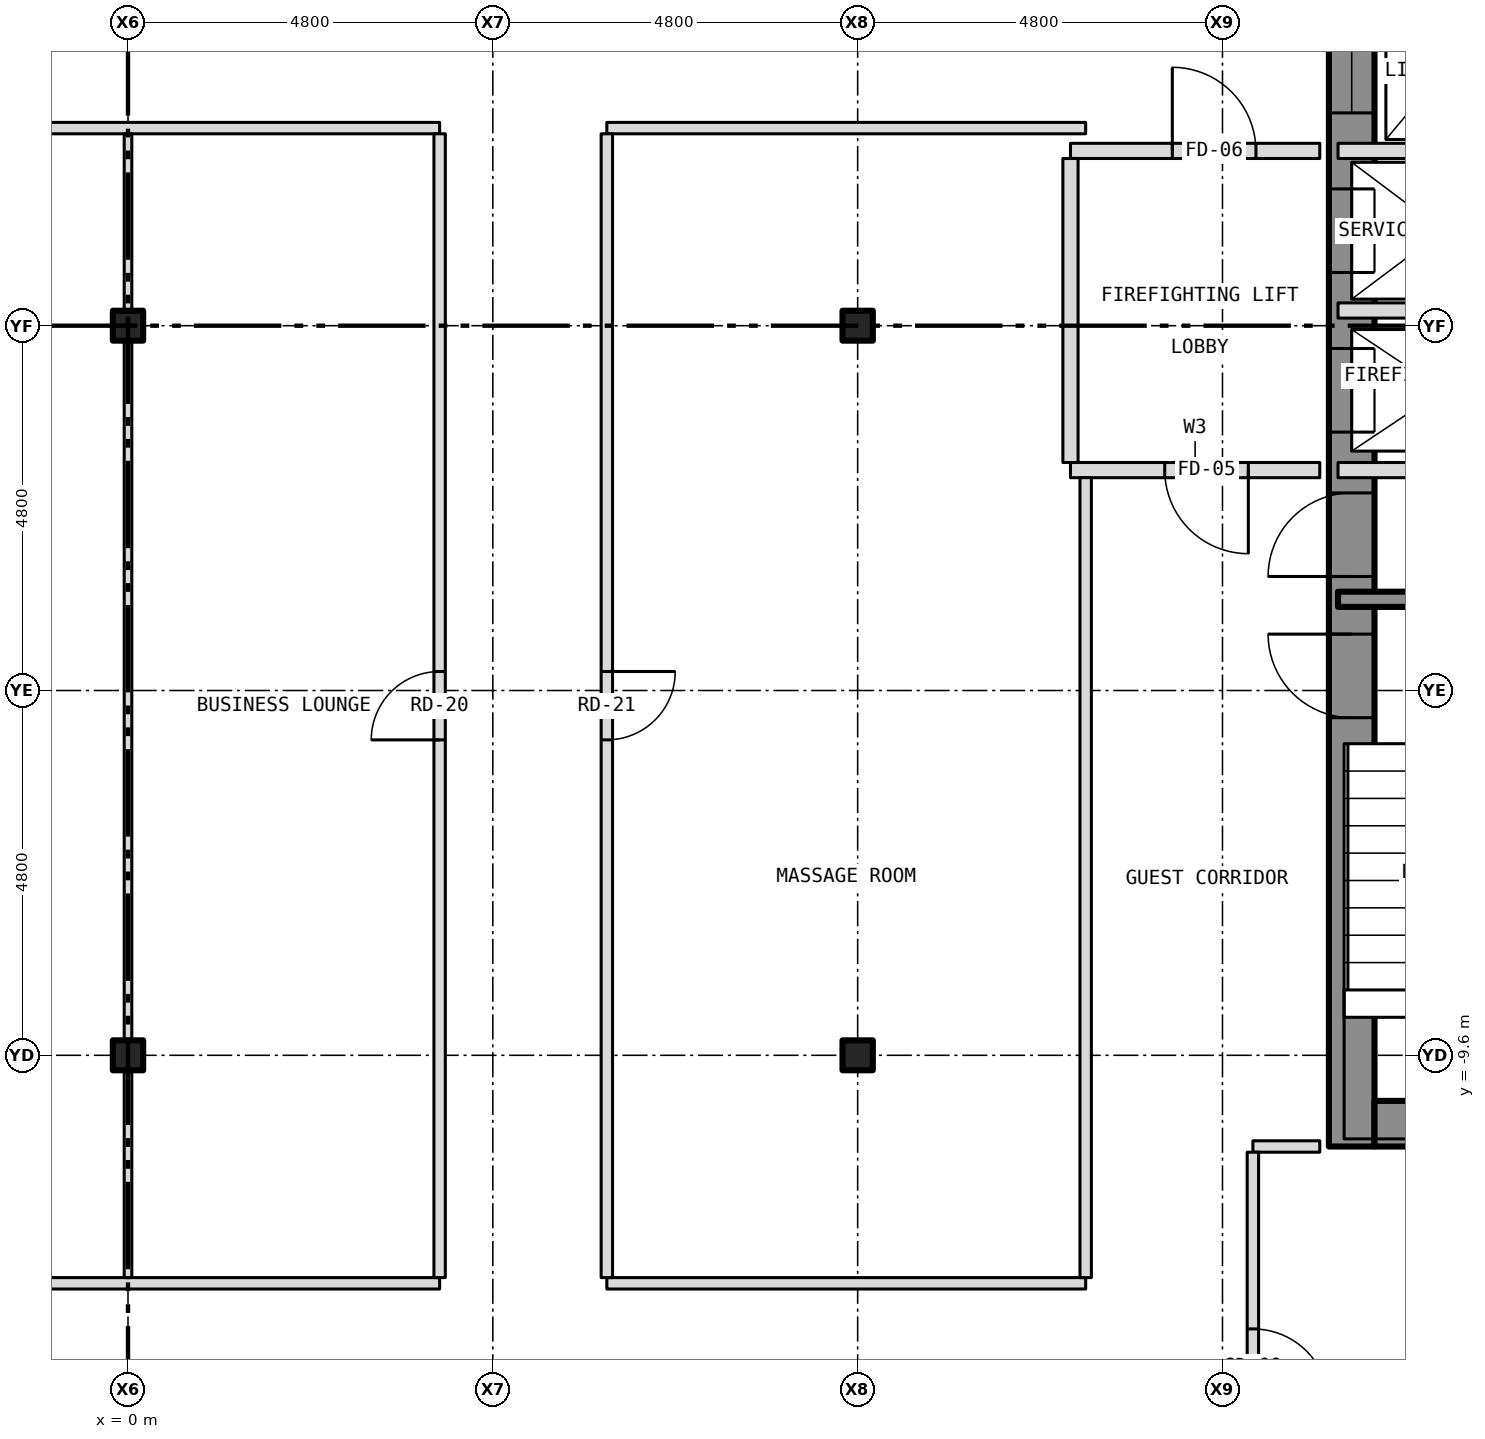
"""IFC4 building model, lengths in metres.
Left out: names, types, materials, properties, quantities, classifications, styles, units other than length and angle.
Written with IfcOpenShell. Run it as: python <this file> out.ifc"""

import sys

from ifc_helpers import new_model, si_unit, direction, frame, frame_2d, origin, origin_2d, place, context, subcontext, project, spatial, rectangle, i_section, extrude, element, fill, save


model = new_model("IFC4")
c1 = context("Model", 3, precision=1e-05, world=origin(), true_north=direction((0.0, 1.0)))
c2 = subcontext(c1, "Body", "Model", "MODEL_VIEW")
j1 = project(units=[si_unit("LENGTHUNIT", "METRE"), si_unit("PLANEANGLEUNIT", "RADIAN")], contexts=[c1])
p1 = place(None, origin())
s1 = spatial("IfcSite", under=j1, at=p1, CompositionType="ELEMENT")
p2 = place(p1, origin())
s2 = spatial("IfcBuilding", under=s1, at=p2, CompositionType="ELEMENT")
p3 = place(p2, frame((0.0, 0.0, 106.5)))
s3 = spatial("IfcBuildingStorey", under=s2, at=p3, CompositionType="ELEMENT", Elevation=106.5)
for number, where, z_axis, x_axis in (
    (1, (0.0, -9.6, -0.15), (0.0, 0.0, 1.0), (1.0, 0.0, 0.0)),
    (2, (0.0, 0.0, -0.15), (0.0, 0.0, 1.0), (1.0, 0.0, 0.0)),
    (3, (9.6, -9.6, -0.15), (0.0, 0.0, 1.0), (1.0, 0.0, 0.0)),
    (4, (9.6, 0.0, -0.15), (0.0, 0.0, 1.0), (1.0, 0.0, 0.0)),
):
    element("IfcColumn", number, at=place(p3, frame(where, z_axis=z_axis, x_axis=x_axis)), inside=s3, PredefinedType="COLUMN", context=c2, shape_type="SweptSolid", body=[
        extrude(i_section(OverallWidth=0.399, OverallDepth=0.394, WebThickness=0.023, FlangeThickness=0.037, at=origin_2d()), origin(), (0.0, 0.0, 1.0), 3.5),
    ])
p4 = place(p3, frame((16.1, -10.8, 0.0), z_axis=(0.0, 0.0, 1.0), x_axis=(0.0, 1.0, 0.0)))
e5 = element("IfcWall", 5, at=p4, inside=s3, PredefinedType="SHEAR", context=c2, shape_type="SweptSolid", body=[
    extrude(rectangle(XDim=21.6, YDim=0.6, at=frame_2d((10.8, 0.0))), origin(), (0.0, 0.0, 1.0), 3.25),
])
p5 = place(p4, frame((9.4, 0.0, 0.0)))
e6 = element("IfcOpeningElement", 6, at=p5, cuts=e5, PredefinedType="OPENING", context=c2, shape_type="SweptSolid", body=[
    extrude(rectangle(XDim=1.1, YDim=2.1, at=frame_2d((0.55, 1.05))), frame((0.0, 0.312, 0.0), z_axis=(0.0, -1.0, 0.0), x_axis=(1.0, 0.0, 0.0)), (0.0, 0.0, 1.0), 0.624),
])
p6 = place(p4, frame((11.5, 0.0, 0.0)))
e7 = element("IfcOpeningElement", 7, at=p6, cuts=e5, PredefinedType="OPENING", context=c2, shape_type="SweptSolid", body=[
    extrude(rectangle(XDim=1.1, YDim=2.1, at=frame_2d((0.55, 1.05))), frame((0.0, 0.312, 0.0), z_axis=(0.0, -1.0, 0.0), x_axis=(1.0, 0.0, 0.0)), (0.0, 0.0, 1.0), 0.624),
])
p7 = place(p4, frame((13.6, 0.0, 0.0)))
e8 = element("IfcOpeningElement", 8, at=p7, cuts=e5, PredefinedType="OPENING", context=c2, shape_type="SweptSolid", body=[
    extrude(rectangle(XDim=1.1, YDim=2.1, at=frame_2d((0.55, 1.05))), frame((0.0, 0.312, 0.0), z_axis=(0.0, -1.0, 0.0), x_axis=(1.0, 0.0, 0.0)), (0.0, 0.0, 1.0), 0.624),
])
p8 = place(p4, frame((15.7, 0.0, 0.0)))
e9 = element("IfcOpeningElement", 9, at=p8, cuts=e5, PredefinedType="OPENING", context=c2, shape_type="SweptSolid", body=[
    extrude(rectangle(XDim=1.1, YDim=2.1, at=frame_2d((0.55, 1.05))), frame((0.0, 0.312, 0.0), z_axis=(0.0, -1.0, 0.0), x_axis=(1.0, 0.0, 0.0)), (0.0, 0.0, 1.0), 0.624),
])
p9 = place(p4, frame((17.8, 0.0, 0.0)))
e10 = element("IfcOpeningElement", 10, at=p9, cuts=e5, PredefinedType="OPENING", context=c2, shape_type="SweptSolid", body=[
    extrude(rectangle(XDim=1.1, YDim=2.1, at=frame_2d((0.55, 1.05))), frame((0.0, 0.312, 0.0), z_axis=(0.0, -1.0, 0.0), x_axis=(1.0, 0.0, 0.0)), (0.0, 0.0, 1.0), 0.624),
])
p10 = place(p4, frame((5.642, 0.0, 0.0)))
e11 = element("IfcOpeningElement", 11, at=p10, cuts=e5, PredefinedType="OPENING", context=c2, shape_type="SweptSolid", body=[
    extrude(rectangle(XDim=1.1, YDim=2.1, at=frame_2d((0.55, 1.05))), frame((0.0, 0.312, 0.0), z_axis=(0.0, -1.0, 0.0), x_axis=(1.0, 0.0, 0.0)), (0.0, 0.0, 1.0), 0.624),
])
p11 = place(p4, frame((7.5, 0.0, 0.0)))
e12 = element("IfcOpeningElement", 12, at=p11, cuts=e5, PredefinedType="OPENING", context=c2, shape_type="SweptSolid", body=[
    extrude(rectangle(XDim=1.1, YDim=2.1, at=frame_2d((0.55, 1.05))), frame((0.0, 0.312, 0.0), z_axis=(0.0, -1.0, 0.0), x_axis=(1.0, 0.0, 0.0)), (0.0, 0.0, 1.0), 0.624),
])
p12 = place(p3, frame((16.4, -10.5, 0.0), z_axis=(0.0, 0.0, 1.0), x_axis=(1.0, 0.0, 0.0)))
e13 = element("IfcWall", 13, at=p12, inside=s3, PredefinedType="SHEAR", context=c2, shape_type="SweptSolid", body=[
    extrude(rectangle(XDim=5.8, YDim=0.6, at=frame_2d((2.9, 0.0))), origin(), (0.0, 0.0, 1.0), 3.25),
])
p13 = place(p3, frame((-12.6, -12.6, 0.0), z_axis=(0.0, 0.0, 1.0), x_axis=(1.0, 0.0, 0.0)))
e14 = element("IfcWall", 14, at=p13, inside=s3, PredefinedType="PARTITIONING", context=c2, shape_type="SweptSolid", body=[
    extrude(rectangle(XDim=16.7, YDim=0.15, at=frame_2d((8.35, 0.0))), origin(), (0.0, 0.0, 1.0), 3.35),
])
p14 = place(p3, frame((6.3, -12.6, 0.0), z_axis=(0.0, 0.0, 1.0), x_axis=(1.0, 0.0, 0.0)))
e15 = element("IfcWall", 15, at=p14, inside=s3, PredefinedType="PARTITIONING", context=c2, shape_type="SweptSolid", body=[
    extrude(rectangle(XDim=6.3, YDim=0.15, at=frame_2d((3.15, 0.0))), origin(), (0.0, 0.0, 1.0), 3.35),
])
p15 = place(p3, frame((14.8, -10.8, 0.0), z_axis=(0.0, 0.0, 1.0), x_axis=(1.0, 0.0, 0.0)))
e16 = element("IfcWall", 16, at=p15, inside=s3, PredefinedType="PARTITIONING", context=c2, shape_type="SweptSolid", body=[
    extrude(rectangle(XDim=0.88, YDim=0.15, at=frame_2d((0.44, 0.0))), origin(), (0.0, 0.0, 1.0), 3.35),
])
p16 = place(p3, frame((15.92, -3.6, 0.0), z_axis=(0.0, 0.0, 1.0), x_axis=(1.0, 0.0, 0.0)))
e17 = element("IfcWall", 17, at=p16, inside=s3, PredefinedType="SHEAR", context=c2, shape_type="SweptSolid", body=[
    extrude(rectangle(XDim=4.08, YDim=0.2, at=frame_2d((2.04, 0.0))), origin(), (0.0, 0.0, 1.0), 3.25),
])
p17 = place(p3, frame((12.4, -1.9, 0.0), z_axis=(0.0, 0.0, 1.0), x_axis=(1.0, 0.0, 0.0)))
e18 = element("IfcWall", 18, at=p17, inside=s3, PredefinedType="PARTITIONING", context=c2, shape_type="SweptSolid", body=[
    extrude(rectangle(XDim=3.28, YDim=0.2, at=frame_2d((1.64, 0.0))), origin(), (0.0, 0.0, 1.0), 3.35),
])
p18 = place(p17, frame((1.24, 0.0, 0.0)))
e19 = element("IfcOpeningElement", 19, at=p18, cuts=e18, PredefinedType="OPENING", context=c2, shape_type="SweptSolid", body=[
    extrude(rectangle(XDim=1.1, YDim=2.1, at=frame_2d((0.55, 1.05))), frame((0.0, 0.112, 0.0), z_axis=(0.0, -1.0, 0.0), x_axis=(1.0, 0.0, 0.0)), (0.0, 0.0, 1.0), 0.224),
])
p19 = place(p3, frame((15.92, -1.9, 0.0), z_axis=(0.0, 0.0, 1.0), x_axis=(1.0, 0.0, 0.0)))
e20 = element("IfcWall", 20, at=p19, inside=s3, PredefinedType="PARTITIONING", context=c2, shape_type="SweptSolid", body=[
    extrude(rectangle(XDim=6.76, YDim=0.2, at=frame_2d((3.38, 0.0))), origin(), (0.0, 0.0, 1.0), 3.25),
])
p20 = place(p19, frame((3.74, 0.0, 0.0)))
e21 = element("IfcOpeningElement", 21, at=p20, cuts=e20, PredefinedType="OPENING", context=c2, shape_type="SweptSolid", body=[
    extrude(rectangle(XDim=0.9, YDim=2.1, at=frame_2d((0.45, 1.05))), frame((0.0, 0.112, 0.0), z_axis=(0.0, -1.0, 0.0), x_axis=(1.0, 0.0, 0.0)), (0.0, 0.0, 1.0), 0.224),
])
p21 = place(p3, frame((15.92, 0.2, 0.0), z_axis=(0.0, 0.0, 1.0), x_axis=(1.0, 0.0, 0.0)))
e22 = element("IfcWall", 22, at=p21, inside=s3, PredefinedType="PARTITIONING", context=c2, shape_type="SweptSolid", body=[
    extrude(rectangle(XDim=2.88, YDim=0.2, at=frame_2d((1.44, 0.0))), origin(), (0.0, 0.0, 1.0), 3.25),
])
p22 = place(p3, frame((12.4, 2.3, 0.0), z_axis=(0.0, 0.0, 1.0), x_axis=(1.0, 0.0, 0.0)))
e23 = element("IfcWall", 23, at=p22, inside=s3, PredefinedType="PARTITIONING", context=c2, shape_type="SweptSolid", body=[
    extrude(rectangle(XDim=3.28, YDim=0.2, at=frame_2d((1.64, 0.0))), origin(), (0.0, 0.0, 1.0), 3.35),
])
p23 = place(p22, frame((1.34, 0.0, 0.0)))
e24 = element("IfcOpeningElement", 24, at=p23, cuts=e23, PredefinedType="OPENING", context=c2, shape_type="SweptSolid", body=[
    extrude(rectangle(XDim=1.1, YDim=2.1, at=frame_2d((0.55, 1.05))), frame((0.0, 0.112, 0.0), z_axis=(0.0, -1.0, 0.0), x_axis=(1.0, 0.0, 0.0)), (0.0, 0.0, 1.0), 0.224),
])
p24 = place(p3, frame((15.92, 2.3, 0.0), z_axis=(0.0, 0.0, 1.0), x_axis=(1.0, 0.0, 0.0)))
e25 = element("IfcWall", 25, at=p24, inside=s3, PredefinedType="PARTITIONING", context=c2, shape_type="SweptSolid", body=[
    extrude(rectangle(XDim=2.88, YDim=0.2, at=frame_2d((1.44, 0.0))), origin(), (0.0, 0.0, 1.0), 3.25),
])
p25 = place(p3, frame((-12.6, 2.6, 0.0), z_axis=(0.0, 0.0, 1.0), x_axis=(1.0, 0.0, 0.0)))
e26 = element("IfcWall", 26, at=p25, inside=s3, PredefinedType="PARTITIONING", context=c2, shape_type="SweptSolid", body=[
    extrude(rectangle(XDim=16.7, YDim=0.15, at=frame_2d((8.35, 0.0))), origin(), (0.0, 0.0, 1.0), 3.35),
])
p26 = place(p25, frame((5.85, 0.0, 0.0)))
e27 = element("IfcOpeningElement", 27, at=p26, cuts=e26, PredefinedType="OPENING", context=c2, shape_type="SweptSolid", body=[
    extrude(rectangle(XDim=0.9, YDim=2.1, at=frame_2d((0.45, 1.05))), frame((0.0, 0.087, 0.0), z_axis=(0.0, -1.0, 0.0), x_axis=(1.0, 0.0, 0.0)), (0.0, 0.0, 1.0), 0.174),
])
p27 = place(p3, frame((6.3, 2.6, 0.0), z_axis=(0.0, 0.0, 1.0), x_axis=(1.0, 0.0, 0.0)))
e28 = element("IfcWall", 28, at=p27, inside=s3, PredefinedType="PARTITIONING", context=c2, shape_type="SweptSolid", body=[
    extrude(rectangle(XDim=6.3, YDim=0.15, at=frame_2d((3.15, 0.0))), origin(), (0.0, 0.0, 1.0), 3.35),
])
p28 = place(p3, frame((0.0, -12.525, 0.0), z_axis=(0.0, 0.0, 1.0), x_axis=(0.0, 1.0, 0.0)))
e29 = element("IfcWall", 29, at=p28, inside=s3, PredefinedType="PARTITIONING", context=c2, shape_type="SweptSolid", body=[
    extrude(rectangle(XDim=2.726, YDim=0.1, at=frame_2d((1.363, 0.0))), origin(), (0.0, 0.0, 1.0), 2.728),
])
p29 = place(p3, frame((0.0, -9.799, 0.0), z_axis=(0.0, 0.0, 1.0), x_axis=(0.0, 1.0, 0.0)))
e30 = element("IfcWall", 30, at=p29, inside=s3, PredefinedType="PARTITIONING", context=c2, shape_type="SweptSolid", body=[
    extrude(rectangle(XDim=0.398, YDim=0.1, at=frame_2d((0.199, 0.0))), origin(), (0.0, 0.0, 1.0), 3.35),
])
p30 = place(p3, frame((0.0, -9.401, 0.0), z_axis=(0.0, 0.0, 1.0), x_axis=(0.0, 1.0, 0.0)))
e31 = element("IfcWall", 31, at=p30, inside=s3, PredefinedType="PARTITIONING", context=c2, shape_type="SweptSolid", body=[
    extrude(rectangle(XDim=9.202, YDim=0.1, at=frame_2d((4.601, 0.0))), origin(), (0.0, 0.0, 1.0), 2.728),
])
p31 = place(p3, frame((0.0, -0.199, 0.0), z_axis=(0.0, 0.0, 1.0), x_axis=(0.0, 1.0, 0.0)))
e32 = element("IfcWall", 32, at=p31, inside=s3, PredefinedType="PARTITIONING", context=c2, shape_type="SweptSolid", body=[
    extrude(rectangle(XDim=0.398, YDim=0.1, at=frame_2d((0.199, 0.0))), origin(), (0.0, 0.0, 1.0), 3.35),
])
p32 = place(p3, frame((0.0, 0.199, 0.0), z_axis=(0.0, 0.0, 1.0), x_axis=(0.0, 1.0, 0.0)))
e33 = element("IfcWall", 33, at=p32, inside=s3, PredefinedType="PARTITIONING", context=c2, shape_type="SweptSolid", body=[
    extrude(rectangle(XDim=2.326, YDim=0.1, at=frame_2d((1.163, 0.0))), origin(), (0.0, 0.0, 1.0), 2.728),
])
p33 = place(p3, frame((4.1, -12.525, 0.0), z_axis=(0.0, 0.0, 1.0), x_axis=(0.0, 1.0, 0.0)))
e34 = element("IfcWall", 34, at=p33, inside=s3, PredefinedType="PARTITIONING", context=c2, shape_type="SweptSolid", body=[
    extrude(rectangle(XDim=15.05, YDim=0.15, at=frame_2d((7.525, 0.0))), origin(), (0.0, 0.0, 1.0), 3.35),
])
p34 = place(p33, frame((7.075, 0.0, 0.0)))
e35 = element("IfcOpeningElement", 35, at=p34, cuts=e34, PredefinedType="OPENING", context=c2, shape_type="SweptSolid", body=[
    extrude(rectangle(XDim=0.9, YDim=2.1, at=frame_2d((0.45, 1.05))), frame((0.0, 0.087, 0.0), z_axis=(0.0, -1.0, 0.0), x_axis=(1.0, 0.0, 0.0)), (0.0, 0.0, 1.0), 0.174),
])
p35 = place(p3, frame((6.3, -12.525, 0.0), z_axis=(0.0, 0.0, 1.0), x_axis=(0.0, 1.0, 0.0)))
e36 = element("IfcWall", 36, at=p35, inside=s3, PredefinedType="PARTITIONING", context=c2, shape_type="SweptSolid", body=[
    extrude(rectangle(XDim=15.05, YDim=0.15, at=frame_2d((7.525, 0.0))), origin(), (0.0, 0.0, 1.0), 3.35),
])
p36 = place(p35, frame((7.075, 0.0, 0.0)))
e37 = element("IfcOpeningElement", 37, at=p36, cuts=e36, PredefinedType="OPENING", context=c2, shape_type="SweptSolid", body=[
    extrude(rectangle(XDim=0.9, YDim=2.1, at=frame_2d((0.45, 1.05))), frame((0.0, 0.087, 0.0), z_axis=(0.0, -1.0, 0.0), x_axis=(1.0, 0.0, 0.0)), (0.0, 0.0, 1.0), 0.174),
])
p37 = place(p3, frame((12.4, -1.8, 0.0), z_axis=(0.0, 0.0, 1.0), x_axis=(0.0, 1.0, 0.0)))
e38 = element("IfcWall", 38, at=p37, inside=s3, PredefinedType="PARTITIONING", context=c2, shape_type="SweptSolid", body=[
    extrude(rectangle(XDim=4.0, YDim=0.2, at=frame_2d((2.0, 0.0))), origin(), (0.0, 0.0, 1.0), 3.35),
])
p38 = place(p3, frame((12.6, -12.525, 0.0), z_axis=(0.0, 0.0, 1.0), x_axis=(0.0, 1.0, 0.0)))
e39 = element("IfcWall", 39, at=p38, inside=s3, PredefinedType="PARTITIONING", context=c2, shape_type="SweptSolid", body=[
    extrude(rectangle(XDim=10.525, YDim=0.15, at=frame_2d((5.262, 0.0))), origin(), (0.0, 0.0, 1.0), 3.35),
])
p39 = place(p3, frame((14.8, -14.725, 0.0), z_axis=(0.0, 0.0, 1.0), x_axis=(0.0, 1.0, 0.0)))
e40 = element("IfcWall", 40, at=p39, inside=s3, PredefinedType="PARTITIONING", context=c2, shape_type="SweptSolid", body=[
    extrude(rectangle(XDim=3.85, YDim=0.15, at=frame_2d((1.925, 0.0))), origin(), (0.0, 0.0, 1.0), 3.35),
])
p40 = place(p39, frame((0.525, 0.0, 0.0)))
e41 = element("IfcOpeningElement", 41, at=p40, cuts=e40, PredefinedType="OPENING", context=c2, shape_type="SweptSolid", body=[
    extrude(rectangle(XDim=1.0, YDim=2.1, at=frame_2d((0.5, 1.05))), frame((0.0, 0.087, 0.0), z_axis=(0.0, -1.0, 0.0), x_axis=(1.0, 0.0, 0.0)), (0.0, 0.0, 1.0), 0.174),
])
p41 = place(p5, origin())
e42 = element("IfcDoor", 42, at=p41, inside=s3, OperationType="SLIDING_TO_LEFT", PredefinedType="DOOR", context=c2, shape_type="SweptSolid", body=[
    extrude(rectangle(XDim=1.1, YDim=2.1, at=frame_2d((0.55, 1.05))), frame((0.0, 0.025, 0.0), z_axis=(0.0, -1.0, 0.0), x_axis=(1.0, 0.0, 0.0)), (0.0, 0.0, 1.0), 0.05),
])
fill(e6, e42)
p42 = place(p6, origin())
e43 = element("IfcDoor", 43, at=p42, inside=s3, OperationType="SLIDING_TO_LEFT", PredefinedType="DOOR", context=c2, shape_type="SweptSolid", body=[
    extrude(rectangle(XDim=1.1, YDim=2.1, at=frame_2d((0.55, 1.05))), frame((0.0, 0.025, 0.0), z_axis=(0.0, -1.0, 0.0), x_axis=(1.0, 0.0, 0.0)), (0.0, 0.0, 1.0), 0.05),
])
fill(e7, e43)
p43 = place(p7, origin())
e44 = element("IfcDoor", 44, at=p43, inside=s3, OperationType="SLIDING_TO_LEFT", PredefinedType="DOOR", context=c2, shape_type="SweptSolid", body=[
    extrude(rectangle(XDim=1.1, YDim=2.1, at=frame_2d((0.55, 1.05))), frame((0.0, 0.025, 0.0), z_axis=(0.0, -1.0, 0.0), x_axis=(1.0, 0.0, 0.0)), (0.0, 0.0, 1.0), 0.05),
])
fill(e8, e44)
p44 = place(p10, origin())
e45 = element("IfcDoor", 45, at=p44, inside=s3, OperationType="SINGLE_SWING_RIGHT", PredefinedType="DOOR", context=c2, shape_type="SweptSolid", body=[
    extrude(rectangle(XDim=1.1, YDim=2.1, at=frame_2d((0.55, 1.05))), frame((0.0, 0.025, 0.0), z_axis=(0.0, -1.0, 0.0), x_axis=(1.0, 0.0, 0.0)), (0.0, 0.0, 1.0), 0.05),
])
fill(e11, e45)
p45 = place(p11, origin())
e46 = element("IfcDoor", 46, at=p45, inside=s3, OperationType="SINGLE_SWING_LEFT", PredefinedType="DOOR", context=c2, shape_type="SweptSolid", body=[
    extrude(rectangle(XDim=1.1, YDim=2.1, at=frame_2d((0.55, 1.05))), frame((0.0, 0.025, 0.0), z_axis=(0.0, -1.0, 0.0), x_axis=(1.0, 0.0, 0.0)), (0.0, 0.0, 1.0), 0.05),
])
fill(e12, e46)
p46 = place(p18, origin())
e47 = element("IfcDoor", 47, at=p46, inside=s3, OperationType="SINGLE_SWING_RIGHT", PredefinedType="DOOR", context=c2, shape_type="SweptSolid", body=[
    extrude(rectangle(XDim=1.1, YDim=2.1, at=frame_2d((0.55, 1.05))), frame((0.0, 0.025, 0.0), z_axis=(0.0, -1.0, 0.0), x_axis=(1.0, 0.0, 0.0)), (0.0, 0.0, 1.0), 0.05),
])
fill(e19, e47)
p47 = place(p23, origin())
e48 = element("IfcDoor", 48, at=p47, inside=s3, OperationType="SINGLE_SWING_LEFT", PredefinedType="DOOR", context=c2, shape_type="SweptSolid", body=[
    extrude(rectangle(XDim=1.1, YDim=2.1, at=frame_2d((0.55, 1.05))), frame((0.0, 0.025, 0.0), z_axis=(0.0, -1.0, 0.0), x_axis=(1.0, 0.0, 0.0)), (0.0, 0.0, 1.0), 0.05),
])
fill(e24, e48)
p48 = place(p40, origin())
e49 = element("IfcDoor", 49, at=p48, inside=s3, OperationType="SINGLE_SWING_LEFT", PredefinedType="DOOR", context=c2, shape_type="SweptSolid", body=[
    extrude(rectangle(XDim=1.0, YDim=2.1, at=frame_2d((0.5, 1.05))), frame((0.0, 0.025, 0.0), z_axis=(0.0, -1.0, 0.0), x_axis=(1.0, 0.0, 0.0)), (0.0, 0.0, 1.0), 0.05),
])
fill(e41, e49)
p49 = place(p34, origin())
e50 = element("IfcDoor", 50, at=p49, inside=s3, OperationType="SINGLE_SWING_LEFT", PredefinedType="DOOR", context=c2, shape_type="SweptSolid", body=[
    extrude(rectangle(XDim=0.9, YDim=2.1, at=frame_2d((0.45, 1.05))), frame((0.0, 0.025, 0.0), z_axis=(0.0, -1.0, 0.0), x_axis=(1.0, 0.0, 0.0)), (0.0, 0.0, 1.0), 0.05),
])
fill(e35, e50)
p50 = place(p36, origin())
e51 = element("IfcDoor", 51, at=p50, inside=s3, OperationType="SINGLE_SWING_RIGHT", PredefinedType="DOOR", context=c2, shape_type="SweptSolid", body=[
    extrude(rectangle(XDim=0.9, YDim=2.1, at=frame_2d((0.45, 1.05))), frame((0.0, 0.025, 0.0), z_axis=(0.0, -1.0, 0.0), x_axis=(1.0, 0.0, 0.0)), (0.0, 0.0, 1.0), 0.05),
])
fill(e37, e51)
save(model, sys.argv[1])
